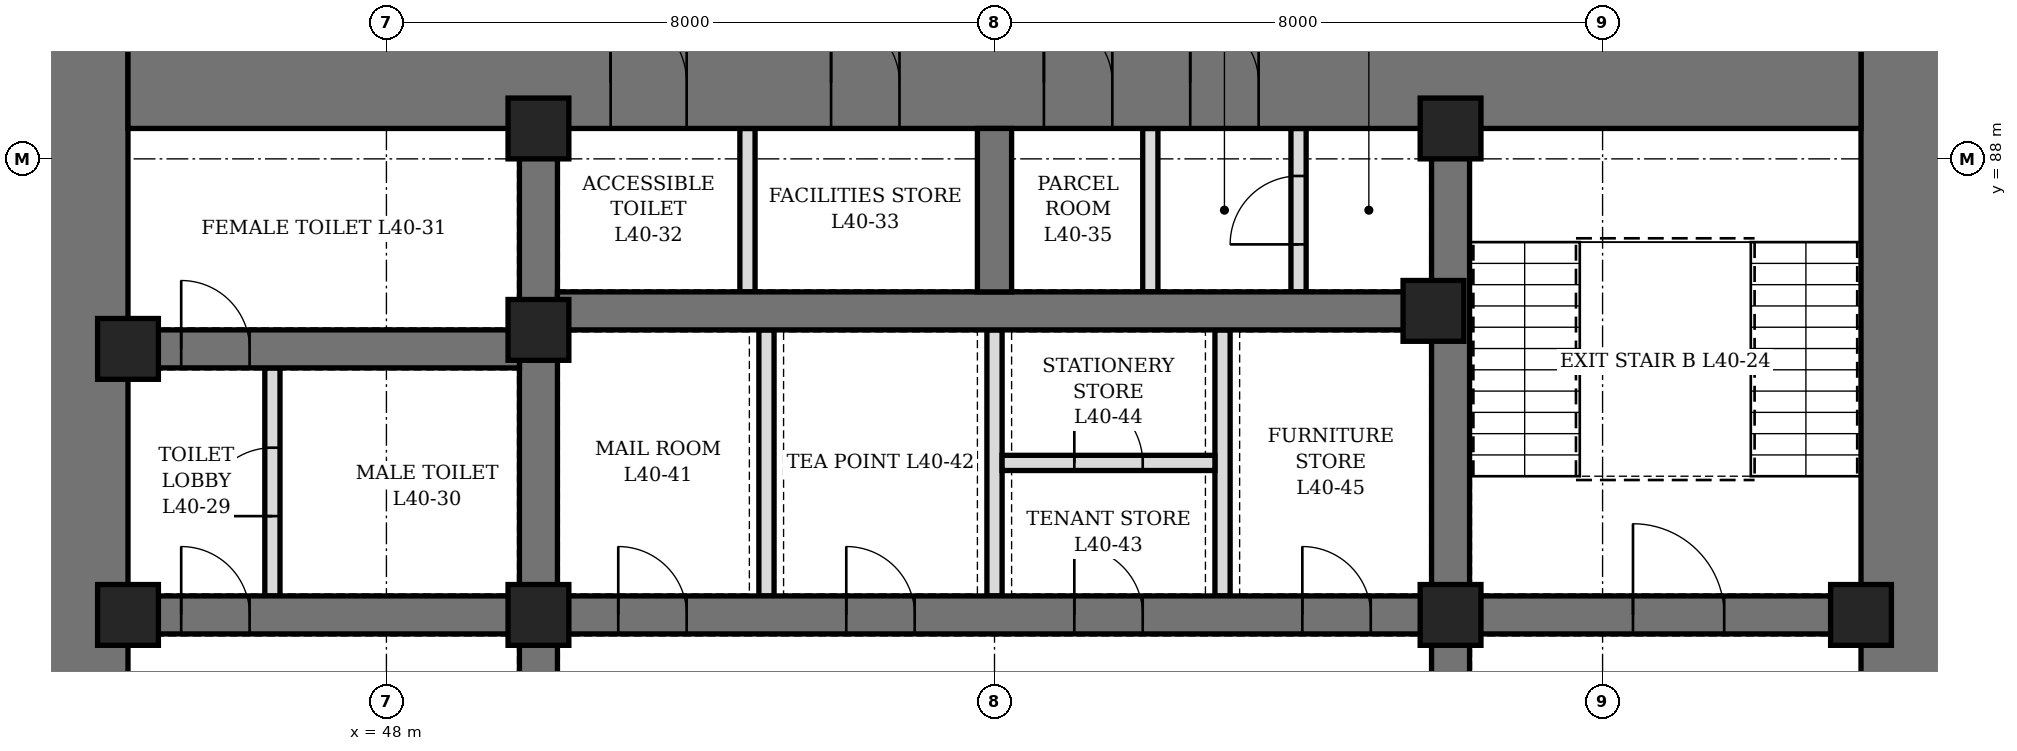
"""IFC4 building model, lengths in metres.
Left out: names, types, materials, properties, quantities, classifications, styles, units other than length and angle.
Written with IfcOpenShell. Run it as: python <this file> out.ifc"""

import sys

from ifc_helpers import new_model, si_unit, direction, frame, frame_2d, origin, origin_2d, place, context, subcontext, project, spatial, rectangle, hollow_rectangle, extrude, element, fill, save


model = new_model("IFC4")
c1 = context("Model", 3, precision=1e-05, world=origin(), true_north=direction((0.0, 1.0)))
c2 = subcontext(c1, "Body", "Model", "MODEL_VIEW")
j1 = project(units=[si_unit("LENGTHUNIT", "METRE"), si_unit("PLANEANGLEUNIT", "RADIAN")], contexts=[c1])
p1 = place(None, origin())
s1 = spatial("IfcSite", under=j1, at=p1, CompositionType="ELEMENT")
p2 = place(p1, origin())
s2 = spatial("IfcBuilding", under=s1, at=p2, CompositionType="ELEMENT")
p3 = place(p2, frame((0.0, 0.0, 181.3)))
s3 = spatial("IfcBuildingStorey", under=s2, at=p3, CompositionType="ELEMENT", Elevation=181.3)
p4 = place(p3, frame((44.0, 70.4, 0.0), z_axis=(0.0, 0.0, 1.0), x_axis=(0.0, 1.0, 0.0)))
e1 = element("IfcWall", 1, at=p4, inside=s3, PredefinedType="SHEAR", context=c2, shape_type="SweptSolid", body=[
    extrude(rectangle(XDim=19.2, YDim=1.2, at=frame_2d((9.6, 0.0))), origin(), (0.0, 0.0, 1.0), 4.2),
])
p5 = place(p4, frame((8.6, 0.0, 0.0)))
e2 = element("IfcOpeningElement", 2, at=p5, cuts=e1, PredefinedType="OPENING", context=c2, shape_type="SweptSolid", body=[
    extrude(rectangle(XDim=2.0, YDim=2.4, at=frame_2d((1.0, 1.2))), frame((0.0, 0.61, 0.0), z_axis=(0.0, -1.0, 0.0), x_axis=(1.0, 0.0, 0.0)), (0.0, 0.0, 1.0), 1.22),
])
p6 = place(p3, frame((68.0, 70.4, 0.0), z_axis=(0.0, 0.0, 1.0), x_axis=(0.0, 1.0, 0.0)))
e3 = element("IfcWall", 3, at=p6, inside=s3, PredefinedType="SHEAR", context=c2, shape_type="SweptSolid", body=[
    extrude(rectangle(XDim=19.2, YDim=1.2, at=frame_2d((9.6, 0.0))), origin(), (0.0, 0.0, 1.0), 4.2),
])
p7 = place(p6, frame((8.6, 0.0, 0.0)))
e4 = element("IfcOpeningElement", 4, at=p7, cuts=e3, PredefinedType="OPENING", context=c2, shape_type="SweptSolid", body=[
    extrude(rectangle(XDim=2.0, YDim=2.4, at=frame_2d((1.0, 1.2))), frame((0.0, 0.61, 0.0), z_axis=(0.0, -1.0, 0.0), x_axis=(1.0, 0.0, 0.0)), (0.0, 0.0, 1.0), 1.22),
])
p8 = place(p3, frame((44.6, 89.0, 0.0), z_axis=(0.0, 0.0, 1.0), x_axis=(1.0, 0.0, 0.0)))
e5 = element("IfcWall", 5, at=p8, inside=s3, PredefinedType="SHEAR", context=c2, shape_type="SweptSolid", body=[
    extrude(rectangle(XDim=22.8, YDim=1.2, at=frame_2d((11.4, 0.0))), origin(), (0.0, 0.0, 1.0), 4.2),
])
p9 = place(p8, frame((6.35, 0.0, 0.0)))
e6 = element("IfcOpeningElement", 6, at=p9, cuts=e5, PredefinedType="OPENING", context=c2, shape_type="SweptSolid", body=[
    extrude(rectangle(XDim=1.0, YDim=2.1, at=frame_2d((0.5, 1.05))), frame((0.0, 0.61, 0.0), z_axis=(0.0, -1.0, 0.0), x_axis=(1.0, 0.0, 0.0)), (0.0, 0.0, 1.0), 1.22),
])
p10 = place(p8, frame((9.25, 0.0, 0.0)))
e7 = element("IfcOpeningElement", 7, at=p10, cuts=e5, PredefinedType="OPENING", context=c2, shape_type="SweptSolid", body=[
    extrude(rectangle(XDim=0.9, YDim=2.1, at=frame_2d((0.45, 1.05))), frame((0.0, 0.61, 0.0), z_axis=(0.0, -1.0, 0.0), x_axis=(1.0, 0.0, 0.0)), (0.0, 0.0, 1.0), 1.22),
])
p11 = place(p8, frame((12.05, 0.0, 0.0)))
e8 = element("IfcOpeningElement", 8, at=p11, cuts=e5, PredefinedType="OPENING", context=c2, shape_type="SweptSolid", body=[
    extrude(rectangle(XDim=0.9, YDim=2.1, at=frame_2d((0.45, 1.05))), frame((0.0, 0.61, 0.0), z_axis=(0.0, -1.0, 0.0), x_axis=(1.0, 0.0, 0.0)), (0.0, 0.0, 1.0), 1.22),
])
p12 = place(p8, frame((13.975, 0.0, 0.0)))
e9 = element("IfcOpeningElement", 9, at=p12, cuts=e5, PredefinedType="OPENING", context=c2, shape_type="SweptSolid", body=[
    extrude(rectangle(XDim=0.9, YDim=2.1, at=frame_2d((0.45, 1.05))), frame((0.0, 0.61, 0.0), z_axis=(0.0, -1.0, 0.0), x_axis=(1.0, 0.0, 0.0)), (0.0, 0.0, 1.0), 1.22),
])
p13 = place(p3, frame((50.0, 71.6, 0.0), z_axis=(0.0, 0.0, 1.0), x_axis=(0.0, 1.0, 0.0)))
e10 = element("IfcWall", 10, at=p13, inside=s3, PredefinedType="SHEAR", context=c2, shape_type="SweptSolid", body=[
    extrude(rectangle(XDim=16.8, YDim=0.5, at=frame_2d((8.4, 0.0))), origin(), (0.0, 0.0, 1.0), 4.2),
])
p14 = place(p13, frame((7.5, 0.0, 0.0)))
e11 = element("IfcOpeningElement", 11, at=p14, cuts=e10, PredefinedType="OPENING", context=c2, shape_type="SweptSolid", body=[
    extrude(rectangle(XDim=1.8, YDim=2.4, at=frame_2d((0.9, 1.2))), frame((0.0, 0.26, 0.0), z_axis=(0.0, -1.0, 0.0), x_axis=(1.0, 0.0, 0.0)), (0.0, 0.0, 1.0), 0.52),
])
p15 = place(p3, frame((62.0, 71.6, 0.0), z_axis=(0.0, 0.0, 1.0), x_axis=(0.0, 1.0, 0.0)))
e12 = element("IfcWall", 12, at=p15, inside=s3, PredefinedType="SHEAR", context=c2, shape_type="SweptSolid", body=[
    extrude(rectangle(XDim=16.8, YDim=0.5, at=frame_2d((8.4, 0.0))), origin(), (0.0, 0.0, 1.0), 4.2),
])
p16 = place(p15, frame((7.5, 0.0, 0.0)))
e13 = element("IfcOpeningElement", 13, at=p16, cuts=e12, PredefinedType="OPENING", context=c2, shape_type="SweptSolid", body=[
    extrude(rectangle(XDim=1.8, YDim=2.4, at=frame_2d((0.9, 1.2))), frame((0.0, 0.26, 0.0), z_axis=(0.0, -1.0, 0.0), x_axis=(1.0, 0.0, 0.0)), (0.0, 0.0, 1.0), 0.52),
])
p17 = place(p3, frame((44.6, 82.0, 0.0), z_axis=(0.0, 0.0, 1.0), x_axis=(1.0, 0.0, 0.0)))
e14 = element("IfcWall", 14, at=p17, inside=s3, PredefinedType="SHEAR", context=c2, shape_type="SweptSolid", body=[
    extrude(rectangle(XDim=5.15, YDim=0.5, at=frame_2d((2.575, 0.0))), origin(), (0.0, 0.0, 1.0), 4.2),
])
p18 = place(p17, frame((0.7, 0.0, 0.0)))
e15 = element("IfcOpeningElement", 15, at=p18, cuts=e14, PredefinedType="OPENING", context=c2, shape_type="SweptSolid", body=[
    extrude(rectangle(XDim=0.9, YDim=2.1, at=frame_2d((0.45, 1.05))), frame((0.0, 0.26, 0.0), z_axis=(0.0, -1.0, 0.0), x_axis=(1.0, 0.0, 0.0)), (0.0, 0.0, 1.0), 0.52),
])
p19 = place(p3, frame((44.6, 85.5, 0.0), z_axis=(0.0, 0.0, 1.0), x_axis=(1.0, 0.0, 0.0)))
e16 = element("IfcWall", 16, at=p19, inside=s3, PredefinedType="SHEAR", context=c2, shape_type="SweptSolid", body=[
    extrude(rectangle(XDim=5.15, YDim=0.5, at=frame_2d((2.575, 0.0))), origin(), (0.0, 0.0, 1.0), 4.2),
])
p20 = place(p19, frame((0.7, 0.0, 0.0)))
e17 = element("IfcOpeningElement", 17, at=p20, cuts=e16, PredefinedType="OPENING", context=c2, shape_type="SweptSolid", body=[
    extrude(rectangle(XDim=0.9, YDim=2.1, at=frame_2d((0.45, 1.05))), frame((0.0, 0.26, 0.0), z_axis=(0.0, -1.0, 0.0), x_axis=(1.0, 0.0, 0.0)), (0.0, 0.0, 1.0), 0.52),
])
p21 = place(p3, frame((62.25, 82.0, 0.0), z_axis=(0.0, 0.0, 1.0), x_axis=(1.0, 0.0, 0.0)))
e18 = element("IfcWall", 18, at=p21, inside=s3, PredefinedType="SHEAR", context=c2, shape_type="SweptSolid", body=[
    extrude(rectangle(XDim=5.15, YDim=0.5, at=frame_2d((2.575, 0.0))), origin(), (0.0, 0.0, 1.0), 4.2),
])
p22 = place(p21, frame((2.15, 0.0, 0.0)))
e19 = element("IfcOpeningElement", 19, at=p22, cuts=e18, PredefinedType="OPENING", context=c2, shape_type="SweptSolid", body=[
    extrude(rectangle(XDim=1.2, YDim=2.1, at=frame_2d((0.6, 1.05))), frame((0.0, 0.26, 0.0), z_axis=(0.0, -1.0, 0.0), x_axis=(1.0, 0.0, 0.0)), (0.0, 0.0, 1.0), 0.52),
])
p23 = place(p3, frame((50.25, 82.0, 0.0), z_axis=(0.0, 0.0, 1.0), x_axis=(1.0, 0.0, 0.0)))
e20 = element("IfcWall", 20, at=p23, inside=s3, PredefinedType="SHEAR", context=c2, shape_type="SweptSolid", body=[
    extrude(rectangle(XDim=11.5, YDim=0.5, at=frame_2d((5.75, 0.0))), origin(), (0.0, 0.0, 1.0), 4.2),
])
p24 = place(p23, frame((0.8, 0.0, 0.0)))
e21 = element("IfcOpeningElement", 21, at=p24, cuts=e20, PredefinedType="OPENING", context=c2, shape_type="SweptSolid", body=[
    extrude(rectangle(XDim=0.9, YDim=2.1, at=frame_2d((0.45, 1.05))), frame((0.0, 0.26, 0.0), z_axis=(0.0, -1.0, 0.0), x_axis=(1.0, 0.0, 0.0)), (0.0, 0.0, 1.0), 0.52),
])
p25 = place(p23, frame((3.8, 0.0, 0.0)))
e22 = element("IfcOpeningElement", 22, at=p25, cuts=e20, PredefinedType="OPENING", context=c2, shape_type="SweptSolid", body=[
    extrude(rectangle(XDim=0.9, YDim=2.1, at=frame_2d((0.45, 1.05))), frame((0.0, 0.26, 0.0), z_axis=(0.0, -1.0, 0.0), x_axis=(1.0, 0.0, 0.0)), (0.0, 0.0, 1.0), 0.52),
])
p26 = place(p23, frame((6.8, 0.0, 0.0)))
e23 = element("IfcOpeningElement", 23, at=p26, cuts=e20, PredefinedType="OPENING", context=c2, shape_type="SweptSolid", body=[
    extrude(rectangle(XDim=0.9, YDim=2.1, at=frame_2d((0.45, 1.05))), frame((0.0, 0.26, 0.0), z_axis=(0.0, -1.0, 0.0), x_axis=(1.0, 0.0, 0.0)), (0.0, 0.0, 1.0), 0.52),
])
p27 = place(p23, frame((9.8, 0.0, 0.0)))
e24 = element("IfcOpeningElement", 24, at=p27, cuts=e20, PredefinedType="OPENING", context=c2, shape_type="SweptSolid", body=[
    extrude(rectangle(XDim=0.9, YDim=2.1, at=frame_2d((0.45, 1.05))), frame((0.0, 0.26, 0.0), z_axis=(0.0, -1.0, 0.0), x_axis=(1.0, 0.0, 0.0)), (0.0, 0.0, 1.0), 0.52),
])
p28 = place(p3, frame((50.25, 86.0, 0.0), z_axis=(0.0, 0.0, 1.0), x_axis=(1.0, 0.0, 0.0)))
e25 = element("IfcWall", 25, at=p28, inside=s3, PredefinedType="SHEAR", context=c2, shape_type="SweptSolid", body=[
    extrude(rectangle(XDim=11.5, YDim=0.5, at=frame_2d((5.75, 0.0))), origin(), (0.0, 0.0, 1.0), 4.2),
])
p29 = place(p3, frame((56.0, 86.25, 0.0), z_axis=(0.0, 0.0, 1.0), x_axis=(0.0, 1.0, 0.0)))
e26 = element("IfcWall", 26, at=p29, inside=s3, PredefinedType="SHEAR", context=c2, shape_type="SweptSolid", body=[
    extrude(rectangle(XDim=2.15, YDim=0.45, at=frame_2d((1.075, 0.0))), origin(), (0.0, 0.0, 1.0), 4.2),
])
for number, where, z_axis, x_axis in (
    (27, (44.6, 82.0, 0.0), (0.0, 0.0, 1.0), (1.0, 0.0, 0.0)),
    (28, (44.6, 85.5, 0.0), (0.0, 0.0, 1.0), (1.0, 0.0, 0.0)),
    (29, (50.0, 82.0, 0.0), (0.0, 0.0, 1.0), (1.0, 0.0, 0.0)),
    (30, (50.0, 85.75, 0.0), (0.0, 0.0, 1.0), (1.0, 0.0, 0.0)),
    (31, (50.0, 88.4, 0.0), (0.0, 0.0, 1.0), (1.0, 0.0, 0.0)),
    (32, (61.775, 86.0, 0.0), (0.0, 0.0, 1.0), (1.0, 0.0, 0.0)),
    (33, (62.0, 82.0, 0.0), (0.0, 0.0, 1.0), (1.0, 0.0, 0.0)),
    (34, (62.0, 88.4, 0.0), (0.0, 0.0, 1.0), (1.0, 0.0, 0.0)),
    (35, (67.4, 82.0, 0.0), (0.0, 0.0, 1.0), (1.0, 0.0, 0.0)),
):
    element("IfcColumn", number, at=place(p3, frame(where, z_axis=z_axis, x_axis=x_axis)), inside=s3, PredefinedType="COLUMN", context=c2, shape_type="SweptSolid", body=[
        extrude(hollow_rectangle(XDim=0.8, YDim=0.8, WallThickness=0.1, at=origin_2d()), origin(), (0.0, 0.0, 1.0), 4.2),
    ])
p30 = place(p3, frame((46.5, 82.25, 0.0), z_axis=(0.0, 0.0, 1.0), x_axis=(0.0, 1.0, 0.0)))
e36 = element("IfcWall", 36, at=p30, inside=s3, PredefinedType="PARTITIONING", context=c2, shape_type="SweptSolid", body=[
    extrude(rectangle(XDim=3.0, YDim=0.2, at=frame_2d((1.5, 0.0))), origin(), (0.0, 0.0, 1.0), 4.04),
])
p31 = place(p30, frame((1.05, 0.0, 0.0)))
e37 = element("IfcOpeningElement", 37, at=p31, cuts=e36, PredefinedType="OPENING", context=c2, shape_type="SweptSolid", body=[
    extrude(rectangle(XDim=0.9, YDim=2.1, at=frame_2d((0.45, 1.05))), frame((0.0, 0.11, 0.0), z_axis=(0.0, -1.0, 0.0), x_axis=(1.0, 0.0, 0.0)), (0.0, 0.0, 1.0), 0.22),
])
p32 = place(p3, frame((52.75, 86.25, 0.0), z_axis=(0.0, 0.0, 1.0), x_axis=(0.0, 1.0, 0.0)))
e38 = element("IfcWall", 38, at=p32, inside=s3, PredefinedType="PARTITIONING", context=c2, shape_type="SweptSolid", body=[
    extrude(rectangle(XDim=2.15, YDim=0.2, at=frame_2d((1.075, 0.0))), origin(), (0.0, 0.0, 1.0), 4.04),
])
p33 = place(p3, frame((60.0, 86.25, 0.0), z_axis=(0.0, 0.0, 1.0), x_axis=(0.0, 1.0, 0.0)))
e39 = element("IfcWall", 39, at=p33, inside=s3, PredefinedType="PARTITIONING", context=c2, shape_type="SweptSolid", body=[
    extrude(rectangle(XDim=2.15, YDim=0.2, at=frame_2d((1.075, 0.0))), origin(), (0.0, 0.0, 1.0), 4.04),
])
p34 = place(p33, frame((0.625, 0.0, 0.0)))
e40 = element("IfcOpeningElement", 40, at=p34, cuts=e39, PredefinedType="OPENING", context=c2, shape_type="SweptSolid", body=[
    extrude(rectangle(XDim=0.9, YDim=2.1, at=frame_2d((0.45, 1.05))), frame((0.0, 0.11, 0.0), z_axis=(0.0, -1.0, 0.0), x_axis=(1.0, 0.0, 0.0)), (0.0, 0.0, 1.0), 0.22),
])
p35 = place(p3, frame((58.05, 86.25, 0.0), z_axis=(0.0, 0.0, 1.0), x_axis=(0.0, 1.0, 0.0)))
e41 = element("IfcWall", 41, at=p35, inside=s3, PredefinedType="PARTITIONING", context=c2, shape_type="SweptSolid", body=[
    extrude(rectangle(XDim=2.15, YDim=0.2, at=frame_2d((1.075, 0.0))), origin(), (0.0, 0.0, 1.0), 4.04),
])
p36 = place(p3, frame((53.0, 82.25, 0.0), z_axis=(0.0, 0.0, 1.0), x_axis=(0.0, 1.0, 0.0)))
e42 = element("IfcWall", 42, at=p36, inside=s3, PredefinedType="PARTITIONING", context=c2, shape_type="SweptSolid", body=[
    extrude(rectangle(XDim=3.5, YDim=0.2, at=frame_2d((1.75, 0.0))), origin(), (0.0, 0.0, 1.0), 4.04),
])
p37 = place(p3, frame((56.0, 82.25, 0.0), z_axis=(0.0, 0.0, 1.0), x_axis=(0.0, 1.0, 0.0)))
e43 = element("IfcWall", 43, at=p37, inside=s3, PredefinedType="PARTITIONING", context=c2, shape_type="SweptSolid", body=[
    extrude(rectangle(XDim=3.5, YDim=0.2, at=frame_2d((1.75, 0.0))), origin(), (0.0, 0.0, 1.0), 2.54),
])
p38 = place(p3, frame((59.0, 82.25, 0.0), z_axis=(0.0, 0.0, 1.0), x_axis=(0.0, 1.0, 0.0)))
e44 = element("IfcWall", 44, at=p38, inside=s3, PredefinedType="PARTITIONING", context=c2, shape_type="SweptSolid", body=[
    extrude(rectangle(XDim=3.5, YDim=0.2, at=frame_2d((1.75, 0.0))), origin(), (0.0, 0.0, 1.0), 4.04),
])
p39 = place(p3, frame((56.1, 84.0, 0.0), z_axis=(0.0, 0.0, 1.0), x_axis=(1.0, 0.0, 0.0)))
e45 = element("IfcWall", 45, at=p39, inside=s3, PredefinedType="PARTITIONING", context=c2, shape_type="SweptSolid", body=[
    extrude(rectangle(XDim=2.8, YDim=0.2, at=frame_2d((1.4, 0.0))), origin(), (0.0, 0.0, 1.0), 4.04),
])
p40 = place(p39, frame((0.95, 0.0, 0.0)))
e46 = element("IfcOpeningElement", 46, at=p40, cuts=e45, PredefinedType="OPENING", context=c2, shape_type="SweptSolid", body=[
    extrude(rectangle(XDim=0.9, YDim=2.1, at=frame_2d((0.45, 1.05))), frame((0.0, 0.11, 0.0), z_axis=(0.0, -1.0, 0.0), x_axis=(1.0, 0.0, 0.0)), (0.0, 0.0, 1.0), 0.22),
])
p41 = place(p18, origin())
e47 = element("IfcDoor", 47, at=p41, inside=s3, OperationType="SINGLE_SWING_LEFT", PredefinedType="DOOR", context=c2, shape_type="SweptSolid", body=[
    extrude(rectangle(XDim=0.9, YDim=2.1, at=frame_2d((0.45, 1.05))), frame((0.0, 0.25, 0.0), z_axis=(0.0, -1.0, 0.0), x_axis=(1.0, 0.0, 0.0)), (0.0, 0.0, 1.0), 0.5),
])
fill(e15, e47)
p42 = place(p31, origin())
e48 = element("IfcDoor", 48, at=p42, inside=s3, OperationType="SINGLE_SWING_RIGHT", PredefinedType="DOOR", context=c2, shape_type="SweptSolid", body=[
    extrude(rectangle(XDim=0.9, YDim=2.1, at=frame_2d((0.45, 1.05))), frame((0.0, 0.1, 0.0), z_axis=(0.0, -1.0, 0.0), x_axis=(1.0, 0.0, 0.0)), (0.0, 0.0, 1.0), 0.199),
])
fill(e37, e48)
p43 = place(p20, origin())
e49 = element("IfcDoor", 49, at=p43, inside=s3, OperationType="SINGLE_SWING_RIGHT", PredefinedType="DOOR", context=c2, shape_type="SweptSolid", body=[
    extrude(rectangle(XDim=0.9, YDim=2.1, at=frame_2d((0.45, 1.05))), frame((0.0, 0.25, 0.0), z_axis=(0.0, -1.0, 0.0), x_axis=(1.0, 0.0, 0.0)), (0.0, 0.0, 1.0), 0.5),
])
fill(e17, e49)
p44 = place(p9, origin())
e50 = element("IfcDoor", 50, at=p44, inside=s3, OperationType="SINGLE_SWING_LEFT", PredefinedType="DOOR", context=c2, shape_type="SweptSolid", body=[
    extrude(rectangle(XDim=1.0, YDim=2.1, at=frame_2d((0.5, 1.05))), frame((0.0, 0.35, 0.0), z_axis=(0.0, -1.0, 0.0), x_axis=(1.0, 0.0, 0.0)), (0.0, 0.0, 1.0), 0.7),
])
fill(e6, e50)
p45 = place(p10, origin())
e51 = element("IfcDoor", 51, at=p45, inside=s3, OperationType="SINGLE_SWING_LEFT", PredefinedType="DOOR", context=c2, shape_type="SweptSolid", body=[
    extrude(rectangle(XDim=0.9, YDim=2.1, at=frame_2d((0.45, 1.05))), frame((0.0, 0.35, 0.0), z_axis=(0.0, -1.0, 0.0), x_axis=(1.0, 0.0, 0.0)), (0.0, 0.0, 1.0), 0.7),
])
fill(e7, e51)
p46 = place(p11, origin())
e52 = element("IfcDoor", 52, at=p46, inside=s3, OperationType="SINGLE_SWING_LEFT", PredefinedType="DOOR", context=c2, shape_type="SweptSolid", body=[
    extrude(rectangle(XDim=0.9, YDim=2.1, at=frame_2d((0.45, 1.05))), frame((0.0, 0.35, 0.0), z_axis=(0.0, -1.0, 0.0), x_axis=(1.0, 0.0, 0.0)), (0.0, 0.0, 1.0), 0.7),
])
fill(e8, e52)
p47 = place(p12, origin())
e53 = element("IfcDoor", 53, at=p47, inside=s3, OperationType="SINGLE_SWING_LEFT", PredefinedType="DOOR", context=c2, shape_type="SweptSolid", body=[
    extrude(rectangle(XDim=0.9, YDim=2.1, at=frame_2d((0.45, 1.05))), frame((0.0, 0.35, 0.0), z_axis=(0.0, -1.0, 0.0), x_axis=(1.0, 0.0, 0.0)), (0.0, 0.0, 1.0), 0.7),
])
fill(e9, e53)
p48 = place(p34, origin())
e54 = element("IfcDoor", 54, at=p48, inside=s3, OperationType="SINGLE_SWING_LEFT", PredefinedType="DOOR", context=c2, shape_type="SweptSolid", body=[
    extrude(rectangle(XDim=0.9, YDim=2.1, at=frame_2d((0.45, 1.05))), frame((0.0, 0.1, 0.0), z_axis=(0.0, -1.0, 0.0), x_axis=(1.0, 0.0, 0.0)), (0.0, 0.0, 1.0), 0.199),
])
fill(e40, e54)
p49 = place(p24, origin())
e55 = element("IfcDoor", 55, at=p49, inside=s3, OperationType="SINGLE_SWING_LEFT", PredefinedType="DOOR", context=c2, shape_type="SweptSolid", body=[
    extrude(rectangle(XDim=0.9, YDim=2.1, at=frame_2d((0.45, 1.05))), frame((0.0, 0.25, 0.0), z_axis=(0.0, -1.0, 0.0), x_axis=(1.0, 0.0, 0.0)), (0.0, 0.0, 1.0), 0.5),
])
fill(e21, e55)
p50 = place(p25, origin())
e56 = element("IfcDoor", 56, at=p50, inside=s3, OperationType="SINGLE_SWING_LEFT", PredefinedType="DOOR", context=c2, shape_type="SweptSolid", body=[
    extrude(rectangle(XDim=0.9, YDim=2.1, at=frame_2d((0.45, 1.05))), frame((0.0, 0.25, 0.0), z_axis=(0.0, -1.0, 0.0), x_axis=(1.0, 0.0, 0.0)), (0.0, 0.0, 1.0), 0.5),
])
fill(e22, e56)
p51 = place(p26, origin())
e57 = element("IfcDoor", 57, at=p51, inside=s3, OperationType="SINGLE_SWING_LEFT", PredefinedType="DOOR", context=c2, shape_type="SweptSolid", body=[
    extrude(rectangle(XDim=0.9, YDim=2.1, at=frame_2d((0.45, 1.05))), frame((0.0, 0.25, 0.0), z_axis=(0.0, -1.0, 0.0), x_axis=(1.0, 0.0, 0.0)), (0.0, 0.0, 1.0), 0.5),
])
fill(e23, e57)
p52 = place(p40, origin())
e58 = element("IfcDoor", 58, at=p52, inside=s3, OperationType="SINGLE_SWING_LEFT", PredefinedType="DOOR", context=c2, shape_type="SweptSolid", body=[
    extrude(rectangle(XDim=0.9, YDim=2.1, at=frame_2d((0.45, 1.05))), frame((0.0, 0.1, 0.0), z_axis=(0.0, -1.0, 0.0), x_axis=(1.0, 0.0, 0.0)), (0.0, 0.0, 1.0), 0.199),
])
fill(e46, e58)
p53 = place(p27, origin())
e59 = element("IfcDoor", 59, at=p53, inside=s3, OperationType="SINGLE_SWING_LEFT", PredefinedType="DOOR", context=c2, shape_type="SweptSolid", body=[
    extrude(rectangle(XDim=0.9, YDim=2.1, at=frame_2d((0.45, 1.05))), frame((0.0, 0.25, 0.0), z_axis=(0.0, -1.0, 0.0), x_axis=(1.0, 0.0, 0.0)), (0.0, 0.0, 1.0), 0.5),
])
fill(e24, e59)
p54 = place(p22, origin())
e60 = element("IfcDoor", 60, at=p54, inside=s3, OperationType="SINGLE_SWING_LEFT", PredefinedType="DOOR", context=c2, shape_type="SweptSolid", body=[
    extrude(rectangle(XDim=1.2, YDim=2.1, at=frame_2d((0.6, 1.05))), frame((0.0, 0.25, 0.0), z_axis=(0.0, -1.0, 0.0), x_axis=(1.0, 0.0, 0.0)), (0.0, 0.0, 1.0), 0.5),
])
fill(e19, e60)
save(model, sys.argv[1])
